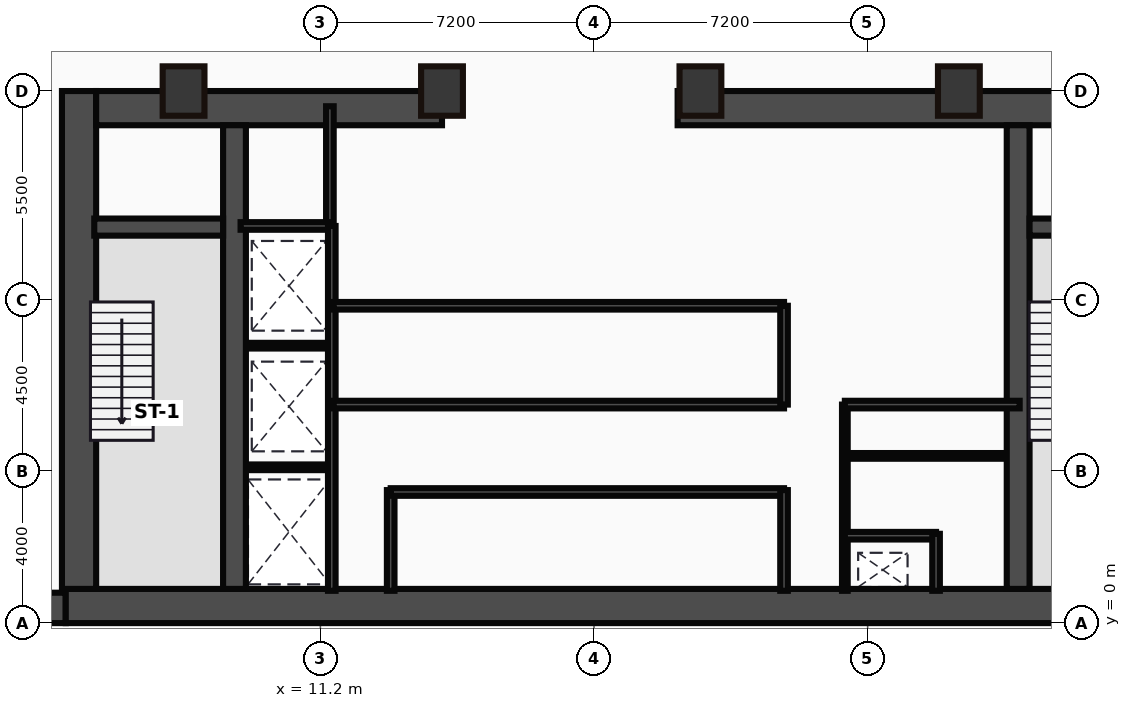
"""IFC4 building model, lengths in metres.
Left out: names, types, materials, properties, quantities, classifications, styles, units other than length and angle.
Written with IfcOpenShell. Run it as: python <this file> out.ifc"""

import sys

from ifc_helpers import new_model, si_unit, direction, frame, frame_2d, origin, origin_2d, place, context, subcontext, project, spatial, rectangle, hollow_rectangle, extrude, source, transform, mapped, element, fill, save


model = new_model("IFC4")
c1 = context("Model", 3, precision=1e-05, world=origin(), true_north=direction((0.0, 1.0)))
c2 = subcontext(c1, "Body", "Model", "MODEL_VIEW")
j1 = project(units=[si_unit("LENGTHUNIT", "METRE"), si_unit("PLANEANGLEUNIT", "RADIAN")], contexts=[c1])
p1 = place(None, origin())
s1 = spatial("IfcSite", under=j1, at=p1, CompositionType="ELEMENT")
p2 = place(p1, origin())
s2 = spatial("IfcBuilding", under=s1, at=p2, CompositionType="ELEMENT")
p3 = place(p2, frame((0.0, 0.0, -5.0)))
s3 = spatial("IfcBuildingStorey", under=s2, at=p3, CompositionType="ELEMENT", Elevation=-5.0)
m1 = source(origin(), c2, "Body", "SweptSolid", [
    extrude(rectangle(XDim=4.5, YDim=0.8, at=frame_2d((2.25, 0.0))), origin(), (0.0, 0.0, 1.0), 5.0),
])
p4 = place(p3, frame((0.0, 0.4, 0.0), z_axis=(0.0, 0.0, 1.0), x_axis=(1.0, 0.0, 0.0)))
e1 = element("IfcWall", 1, at=p4, inside=s3, PredefinedType="USERDEFINED", context=c2, shape_type="MappedRepresentation", body=[
    mapped(m1, transform((0.0, 0.0, 0.0))),
])
m2 = source(origin(), c2, "Body", "SweptSolid", [
    extrude(rectangle(XDim=29.5, YDim=0.9, at=frame_2d((14.75, 0.0))), origin(), (0.0, 0.0, 1.0), 5.0),
])
p5 = place(p3, frame((4.5, 0.45, 0.0), z_axis=(0.0, 0.0, 1.0), x_axis=(1.0, 0.0, 0.0)))
e2 = element("IfcWall", 2, at=p5, inside=s3, PredefinedType="SHEAR", context=c2, shape_type="MappedRepresentation", body=[
    mapped(m2, transform((0.0, 0.0, 0.0))),
])
m3 = source(origin(), c2, "Body", "SweptSolid", [
    extrude(rectangle(XDim=13.1, YDim=0.9, at=frame_2d((6.55, 0.0))), origin(), (0.0, 0.0, 1.0), 5.0),
])
p6 = place(p3, frame((4.85, 0.9, 0.0), z_axis=(0.0, 0.0, 1.0), x_axis=(0.0, 1.0, 0.0)))
e3 = element("IfcWall", 3, at=p6, inside=s3, PredefinedType="SHEAR", context=c2, shape_type="MappedRepresentation", body=[
    mapped(m3, transform((0.0, 0.0, 0.0))),
])
m4 = source(origin(), c2, "Body", "SweptSolid", [
    extrude(rectangle(XDim=9.1, YDim=0.9, at=frame_2d((4.55, 0.0))), origin(), (0.0, 0.0, 1.0), 5.0),
])
p7 = place(p3, frame((5.3, 13.55, 0.0), z_axis=(0.0, 0.0, 1.0), x_axis=(1.0, 0.0, 0.0)))
e4 = element("IfcWall", 4, at=p7, inside=s3, PredefinedType="SHEAR", context=c2, shape_type="MappedRepresentation", body=[
    mapped(m4, transform((0.0, 0.0, 0.0))),
])
p8 = place(p7, frame((4.1, 0.0, 0.0)))
e5 = element("IfcOpeningElement", 5, at=p8, cuts=e4, PredefinedType="OPENING", context=c2, shape_type="SweptSolid", body=[
    extrude(rectangle(XDim=1.1, YDim=2.15, at=frame_2d((0.55, 1.075))), frame((0.0, 0.46, 0.0), z_axis=(0.0, -1.0, 0.0), x_axis=(1.0, 0.0, 0.0)), (0.0, 0.0, 1.0), 0.92),
])
m5 = source(origin(), c2, "Body", "SweptSolid", [
    extrude(rectangle(XDim=12.6, YDim=0.9, at=frame_2d((6.3, 0.0))), origin(), (0.0, 0.0, 1.0), 5.0),
])
p9 = place(p3, frame((20.6, 13.55, 0.0), z_axis=(0.0, 0.0, 1.0), x_axis=(1.0, 0.0, 0.0)))
e6 = element("IfcWall", 6, at=p9, inside=s3, PredefinedType="SHEAR", context=c2, shape_type="MappedRepresentation", body=[
    mapped(m5, transform((0.0, 0.0, 0.0))),
])
p10 = place(p9, frame((9.25, 0.0, 0.0)))
e7 = element("IfcOpeningElement", 7, at=p10, cuts=e6, PredefinedType="OPENING", context=c2, shape_type="SweptSolid", body=[
    extrude(rectangle(XDim=1.1, YDim=2.15, at=frame_2d((0.55, 1.075))), frame((0.0, 0.46, 0.0), z_axis=(0.0, -1.0, 0.0), x_axis=(1.0, 0.0, 0.0)), (0.0, 0.0, 1.0), 0.92),
])
m6 = source(origin(), c2, "Body", "SweptSolid", [
    extrude(rectangle(XDim=12.2, YDim=0.6, at=frame_2d((6.1, 0.0))), origin(), (0.0, 0.0, 1.0), 5.0),
])
for number, where, z_axis, x_axis in (
    (8, (8.94, 0.9, 0.0), (0.0, 0.0, 1.0), (0.0, 1.0, 0.0)),
    (9, (29.56, 0.9, 0.0), (0.0, 0.0, 1.0), (0.0, 1.0, 0.0)),
):
    element("IfcWall", number, at=place(p3, frame(where, z_axis=z_axis, x_axis=x_axis)), inside=s3, PredefinedType="SHEAR", context=c2, shape_type="MappedRepresentation", body=[
        mapped(m6, transform((0.0, 0.0, 0.0))),
    ])
m7 = source(origin(), c2, "Body", "SweptSolid", [
    extrude(rectangle(XDim=3.39, YDim=0.45, at=frame_2d((1.695, 0.0))), origin(), (0.0, 0.0, 1.0), 5.0),
])
p11 = place(p3, frame((5.25, 10.42, 0.0), z_axis=(0.0, 0.0, 1.0), x_axis=(1.0, 0.0, 0.0)))
e10 = element("IfcWall", 10, at=p11, inside=s3, PredefinedType="SHEAR", context=c2, shape_type="MappedRepresentation", body=[
    mapped(m7, transform((0.0, 0.0, 0.0))),
])
p12 = place(p11, frame((1.05, 0.0, 0.0)))
e11 = element("IfcOpeningElement", 11, at=p12, cuts=e10, PredefinedType="OPENING", context=c2, shape_type="SweptSolid", body=[
    extrude(rectangle(XDim=1.1, YDim=2.15, at=frame_2d((0.55, 1.075))), frame((0.0, 0.235, 0.0), z_axis=(0.0, -1.0, 0.0), x_axis=(1.0, 0.0, 0.0)), (0.0, 0.0, 1.0), 0.47),
])
p13 = place(p3, frame((29.86, 10.42, 0.0), z_axis=(0.0, 0.0, 1.0), x_axis=(1.0, 0.0, 0.0)))
e12 = element("IfcWall", 12, at=p13, inside=s3, PredefinedType="SHEAR", context=c2, shape_type="MappedRepresentation", body=[
    mapped(m7, transform((0.0, 0.0, 0.0))),
])
p14 = place(p13, frame((1.1, 0.0, 0.0)))
e13 = element("IfcOpeningElement", 13, at=p14, cuts=e12, PredefinedType="OPENING", context=c2, shape_type="SweptSolid", body=[
    extrude(rectangle(XDim=1.1, YDim=2.15, at=frame_2d((0.55, 1.075))), frame((0.0, 0.235, 0.0), z_axis=(0.0, -1.0, 0.0), x_axis=(1.0, 0.0, 0.0)), (0.0, 0.0, 1.0), 0.47),
])
m8 = source(origin(), c2, "Body", "SweptSolid", [
    extrude(hollow_rectangle(XDim=1.1, YDim=1.3, WallThickness=0.055, at=origin_2d()), origin(), (0.0, 0.0, 1.0), 5.0),
])
for number, where, z_axis, x_axis in (
    (14, (7.6, 14.0, 0.0), (0.0, 0.0, 1.0), (1.0, 0.0, 0.0)),
    (15, (14.4, 14.0, 0.0), (0.0, 0.0, 1.0), (1.0, 0.0, 0.0)),
    (16, (21.2, 14.0, 0.0), (0.0, 0.0, 1.0), (1.0, 0.0, 0.0)),
    (17, (28.0, 14.0, 0.0), (0.0, 0.0, 1.0), (1.0, 0.0, 0.0)),
):
    element("IfcColumn", number, at=place(p3, frame(where, z_axis=z_axis, x_axis=x_axis)), inside=s3, PredefinedType="PILASTER", context=c2, shape_type="MappedRepresentation", body=[
        mapped(m8, transform((0.0, 0.0, 0.0))),
    ])
m9 = source(origin(), c2, "Body", "SweptSolid", [
    extrude(rectangle(XDim=3.18, YDim=0.2, at=frame_2d((1.59, 0.0))), origin(), (0.0, 0.0, 1.0), 4.7),
])
p15 = place(p3, frame((11.45, 10.42, 0.0), z_axis=(0.0, 0.0, 1.0), x_axis=(0.0, 1.0, 0.0)))
e18 = element("IfcWall", 18, at=p15, inside=s3, PredefinedType="PARTITIONING", context=c2, shape_type="MappedRepresentation", body=[
    mapped(m9, transform((0.0, 0.0, 0.0))),
])
m10 = source(origin(), c2, "Body", "SweptSolid", [
    extrude(rectangle(XDim=2.35, YDim=0.2, at=frame_2d((1.175, 0.0))), origin(), (0.0, 0.0, 1.0), 4.7),
])
p16 = place(p3, frame((9.1, 10.45, 0.0), z_axis=(0.0, 0.0, 1.0), x_axis=(1.0, 0.0, 0.0)))
e19 = element("IfcWall", 19, at=p16, inside=s3, PredefinedType="PARTITIONING", context=c2, shape_type="MappedRepresentation", body=[
    mapped(m10, transform((0.0, 0.0, 0.0))),
])
p17 = place(p16, frame((0.55, 0.0, 0.0)))
e20 = element("IfcOpeningElement", 20, at=p17, cuts=e19, PredefinedType="OPENING", context=c2, shape_type="SweptSolid", body=[
    extrude(rectangle(XDim=1.1, YDim=2.15, at=frame_2d((0.55, 1.075))), frame((0.0, 0.11, 0.0), z_axis=(0.0, -1.0, 0.0), x_axis=(1.0, 0.0, 0.0)), (0.0, 0.0, 1.0), 0.22),
])
m11 = source(origin(), c2, "Body", "SweptSolid", [
    extrude(rectangle(XDim=9.6, YDim=0.2, at=frame_2d((4.8, 0.0))), origin(), (0.0, 0.0, 1.0), 4.7),
])
p18 = place(p3, frame((11.5, 0.85, 0.0), z_axis=(0.0, 0.0, 1.0), x_axis=(0.0, 1.0, 0.0)))
e21 = element("IfcWall", 21, at=p18, inside=s3, PredefinedType="PARTITIONING", context=c2, shape_type="MappedRepresentation", body=[
    mapped(m11, transform((0.0, 0.0, 0.0))),
])
p19 = place(p18, frame((4.2, 0.0, 0.0)))
e22 = element("IfcOpeningElement", 22, at=p19, cuts=e21, PredefinedType="OPENING", context=c2, shape_type="SweptSolid", body=[
    extrude(rectangle(XDim=1.1, YDim=2.15, at=frame_2d((0.55, 1.075))), frame((0.0, 0.11, 0.0), z_axis=(0.0, -1.0, 0.0), x_axis=(1.0, 0.0, 0.0)), (0.0, 0.0, 1.0), 0.22),
])
p20 = place(p18, frame((0.9, 0.0, 0.0)))
e23 = element("IfcOpeningElement", 23, at=p20, cuts=e21, PredefinedType="OPENING", context=c2, shape_type="SweptSolid", body=[
    extrude(rectangle(XDim=1.2, YDim=2.15, at=frame_2d((0.6, 1.075))), frame((0.0, 0.11, 0.0), z_axis=(0.0, -1.0, 0.0), x_axis=(1.0, 0.0, 0.0)), (0.0, 0.0, 1.0), 0.22),
])
m12 = source(origin(), c2, "Body", "SweptSolid", [
    extrude(rectangle(XDim=2.4, YDim=0.15, at=frame_2d((1.2, 0.0))), origin(), (0.0, 0.0, 1.0), 4.7),
])
for number, where, z_axis, x_axis in (
    (24, (9.1, 4.1, 0.0), (0.0, 0.0, 1.0), (1.0, 0.0, 0.0)),
    (25, (9.1, 7.3, 0.0), (0.0, 0.0, 1.0), (1.0, 0.0, 0.0)),
):
    element("IfcWall", number, at=place(p3, frame(where, z_axis=z_axis, x_axis=x_axis)), inside=s3, PredefinedType="PARTITIONING", context=c2, shape_type="MappedRepresentation", body=[
        mapped(m12, transform((0.0, 0.0, 0.0))),
    ])
m13 = source(origin(), c2, "Body", "SweptSolid", [
    extrude(rectangle(XDim=2.65, YDim=0.2, at=frame_2d((1.325, 0.0))), origin(), (0.0, 0.0, 1.0), 4.7),
])
p21 = place(p3, frame((13.05, 0.85, 0.0), z_axis=(0.0, 0.0, 1.0), x_axis=(0.0, 1.0, 0.0)))
e26 = element("IfcWall", 26, at=p21, inside=s3, PredefinedType="PARTITIONING", context=c2, shape_type="MappedRepresentation", body=[
    mapped(m13, transform((0.0, 0.0, 0.0))),
])
m14 = source(origin(), c2, "Body", "SweptSolid", [
    extrude(rectangle(XDim=10.35, YDim=0.2, at=frame_2d((5.175, 0.0))), origin(), (0.0, 0.0, 1.0), 4.7),
])
p22 = place(p3, frame((13.05, 3.45, 0.0), z_axis=(0.0, 0.0, 1.0), x_axis=(1.0, 0.0, 0.0)))
e27 = element("IfcWall", 27, at=p22, inside=s3, PredefinedType="PARTITIONING", context=c2, shape_type="MappedRepresentation", body=[
    mapped(m14, transform((0.0, 0.0, 0.0))),
])
p23 = place(p22, frame((5.2, 0.0, 0.0)))
e28 = element("IfcOpeningElement", 28, at=p23, cuts=e27, PredefinedType="OPENING", context=c2, shape_type="SweptSolid", body=[
    extrude(rectangle(XDim=1.1, YDim=2.15, at=frame_2d((0.55, 1.075))), frame((0.0, 0.11, 0.0), z_axis=(0.0, -1.0, 0.0), x_axis=(1.0, 0.0, 0.0)), (0.0, 0.0, 1.0), 0.22),
])
p24 = place(p3, frame((23.4, 0.85, 0.0), z_axis=(0.0, 0.0, 1.0), x_axis=(0.0, 1.0, 0.0)))
e29 = element("IfcWall", 29, at=p24, inside=s3, PredefinedType="PARTITIONING", context=c2, shape_type="MappedRepresentation", body=[
    mapped(m13, transform((0.0, 0.0, 0.0))),
])
m15 = source(origin(), c2, "Body", "SweptSolid", [
    extrude(rectangle(XDim=11.85, YDim=0.2, at=frame_2d((5.925, 0.0))), origin(), (0.0, 0.0, 1.0), 4.7),
])
p25 = place(p3, frame((11.55, 5.75, 0.0), z_axis=(0.0, 0.0, 1.0), x_axis=(1.0, 0.0, 0.0)))
e30 = element("IfcWall", 30, at=p25, inside=s3, PredefinedType="PARTITIONING", context=c2, shape_type="MappedRepresentation", body=[
    mapped(m15, transform((0.0, 0.0, 0.0))),
])
p26 = place(p25, frame((5.2, 0.0, 0.0)))
e31 = element("IfcOpeningElement", 31, at=p26, cuts=e30, PredefinedType="OPENING", context=c2, shape_type="SweptSolid", body=[
    extrude(rectangle(XDim=1.1, YDim=2.15, at=frame_2d((0.55, 1.075))), frame((0.0, 0.11, 0.0), z_axis=(0.0, -1.0, 0.0), x_axis=(1.0, 0.0, 0.0)), (0.0, 0.0, 1.0), 0.22),
])
p27 = place(p3, frame((11.55, 8.35, 0.0), z_axis=(0.0, 0.0, 1.0), x_axis=(1.0, 0.0, 0.0)))
e32 = element("IfcWall", 32, at=p27, inside=s3, PredefinedType="PARTITIONING", context=c2, shape_type="MappedRepresentation", body=[
    mapped(m15, transform((0.0, 0.0, 0.0))),
])
m16 = source(origin(), c2, "Body", "SweptSolid", [
    extrude(rectangle(XDim=2.6, YDim=0.2, at=frame_2d((1.3, 0.0))), origin(), (0.0, 0.0, 1.0), 4.7),
])
p28 = place(p3, frame((23.4, 5.75, 0.0), z_axis=(0.0, 0.0, 1.0), x_axis=(0.0, 1.0, 0.0)))
e33 = element("IfcWall", 33, at=p28, inside=s3, PredefinedType="PARTITIONING", context=c2, shape_type="MappedRepresentation", body=[
    mapped(m16, transform((0.0, 0.0, 0.0))),
])
m17 = source(origin(), c2, "Body", "SweptSolid", [
    extrude(rectangle(XDim=4.9, YDim=0.15, at=frame_2d((2.45, 0.0))), origin(), (0.0, 0.0, 1.0), 4.7),
])
p29 = place(p3, frame((25.0, 0.85, 0.0), z_axis=(0.0, 0.0, 1.0), x_axis=(0.0, 1.0, 0.0)))
e34 = element("IfcWall", 34, at=p29, inside=s3, PredefinedType="PARTITIONING", context=c2, shape_type="MappedRepresentation", body=[
    mapped(m17, transform((0.0, 0.0, 0.0))),
])
p30 = place(p29, frame((2.0, 0.0, 0.0)))
e35 = element("IfcOpeningElement", 35, at=p30, cuts=e34, PredefinedType="OPENING", context=c2, shape_type="SweptSolid", body=[
    extrude(rectangle(XDim=0.95, YDim=2.15, at=frame_2d((0.475, 1.075))), frame((0.0, 0.085, 0.0), z_axis=(0.0, -1.0, 0.0), x_axis=(1.0, 0.0, 0.0)), (0.0, 0.0, 1.0), 0.17),
])
p31 = place(p29, frame((3.75, 0.0, 0.0)))
e36 = element("IfcOpeningElement", 36, at=p31, cuts=e34, PredefinedType="OPENING", context=c2, shape_type="SweptSolid", body=[
    extrude(rectangle(XDim=0.85, YDim=2.15, at=frame_2d((0.425, 1.075))), frame((0.0, 0.085, 0.0), z_axis=(0.0, -1.0, 0.0), x_axis=(1.0, 0.0, 0.0)), (0.0, 0.0, 1.0), 0.17),
])
m18 = source(origin(), c2, "Body", "SweptSolid", [
    extrude(rectangle(XDim=4.6, YDim=0.2, at=frame_2d((2.3, 0.0))), origin(), (0.0, 0.0, 1.0), 4.7),
])
p32 = place(p3, frame((25.0, 5.75, 0.0), z_axis=(0.0, 0.0, 1.0), x_axis=(1.0, 0.0, 0.0)))
e37 = element("IfcWall", 37, at=p32, inside=s3, PredefinedType="PARTITIONING", context=c2, shape_type="MappedRepresentation", body=[
    mapped(m18, transform((0.0, 0.0, 0.0))),
])
m19 = source(origin(), c2, "Body", "SweptSolid", [
    extrude(rectangle(XDim=2.4, YDim=0.2, at=frame_2d((1.2, 0.0))), origin(), (0.0, 0.0, 1.0), 4.7),
])
p33 = place(p3, frame((25.0, 2.3, 0.0), z_axis=(0.0, 0.0, 1.0), x_axis=(1.0, 0.0, 0.0)))
e38 = element("IfcWall", 38, at=p33, inside=s3, PredefinedType="PARTITIONING", context=c2, shape_type="MappedRepresentation", body=[
    mapped(m19, transform((0.0, 0.0, 0.0))),
])
m20 = source(origin(), c2, "Body", "SweptSolid", [
    extrude(rectangle(XDim=1.5, YDim=0.2, at=frame_2d((0.75, 0.0))), origin(), (0.0, 0.0, 1.0), 4.7),
])
p34 = place(p3, frame((27.4, 0.85, 0.0), z_axis=(0.0, 0.0, 1.0), x_axis=(0.0, 1.0, 0.0)))
e39 = element("IfcWall", 39, at=p34, inside=s3, PredefinedType="PARTITIONING", context=c2, shape_type="MappedRepresentation", body=[
    mapped(m20, transform((0.0, 0.0, 0.0))),
])
m21 = source(origin(), c2, "Body", "SweptSolid", [
    extrude(rectangle(XDim=4.55, YDim=0.15, at=frame_2d((2.275, 0.0))), origin(), (0.0, 0.0, 1.0), 4.7),
])
p35 = place(p3, frame((25.0, 4.4, 0.0), z_axis=(0.0, 0.0, 1.0), x_axis=(1.0, 0.0, 0.0)))
e40 = element("IfcWall", 40, at=p35, inside=s3, PredefinedType="PARTITIONING", context=c2, shape_type="MappedRepresentation", body=[
    mapped(m21, transform((0.0, 0.0, 0.0))),
])
m22 = source(origin(), c2, "Body", "SweptSolid", [
    extrude(rectangle(XDim=1.1, YDim=2.15, at=frame_2d((0.55, 1.075))), frame((0.0, 0.025, 0.0), z_axis=(0.0, -1.0, 0.0), x_axis=(1.0, 0.0, 0.0)), (0.0, 0.0, 1.0), 0.05),
])
p36 = place(p12, frame((1.1, 0.0, 0.0), z_axis=(0.0, 0.0, 1.0), x_axis=(-1.0, 0.0, 0.0)))
e41 = element("IfcDoor", 41, at=p36, inside=s3, OperationType="SINGLE_SWING_LEFT", PredefinedType="DOOR", context=c2, shape_type="MappedRepresentation", body=[
    mapped(m22, transform((0.0, 0.0, 0.0))),
])
fill(e11, e41)
p37 = place(p8, origin())
e42 = element("IfcDoor", 42, at=p37, inside=s3, OperationType="SINGLE_SWING_RIGHT", PredefinedType="DOOR", context=c2, shape_type="MappedRepresentation", body=[
    mapped(m22, transform((0.0, 0.0, 0.0))),
])
fill(e5, e42)
p38 = place(p10, origin())
e43 = element("IfcDoor", 43, at=p38, inside=s3, OperationType="SINGLE_SWING_LEFT", PredefinedType="DOOR", context=c2, shape_type="MappedRepresentation", body=[
    mapped(m22, transform((0.0, 0.0, 0.0))),
])
fill(e7, e43)
p39 = place(p17, origin())
e44 = element("IfcDoor", 44, at=p39, inside=s3, OperationType="SLIDING_TO_LEFT", PredefinedType="DOOR", context=c2, shape_type="MappedRepresentation", body=[
    mapped(m22, transform((0.0, 0.0, 0.0))),
])
fill(e20, e44)
p40 = place(p19, frame((1.1, 0.0, 0.0), z_axis=(0.0, 0.0, 1.0), x_axis=(-1.0, 0.0, 0.0)))
e45 = element("IfcDoor", 45, at=p40, inside=s3, OperationType="SLIDING_TO_LEFT", PredefinedType="DOOR", context=c2, shape_type="MappedRepresentation", body=[
    mapped(m22, transform((0.0, 0.0, 0.0))),
])
fill(e22, e45)
m23 = source(origin(), c2, "Body", "SweptSolid", [
    extrude(rectangle(XDim=1.2, YDim=2.15, at=frame_2d((0.6, 1.075))), frame((0.0, 0.025, 0.0), z_axis=(0.0, -1.0, 0.0), x_axis=(1.0, 0.0, 0.0)), (0.0, 0.0, 1.0), 0.05),
])
p41 = place(p20, frame((1.2, 0.0, 0.0), z_axis=(0.0, 0.0, 1.0), x_axis=(-1.0, 0.0, 0.0)))
e46 = element("IfcDoor", 46, at=p41, inside=s3, OperationType="SLIDING_TO_LEFT", PredefinedType="DOOR", context=c2, shape_type="MappedRepresentation", body=[
    mapped(m23, transform((0.0, 0.0, 0.0))),
])
fill(e23, e46)
p42 = place(p23, origin())
e47 = element("IfcDoor", 47, at=p42, inside=s3, OperationType="SINGLE_SWING_LEFT", PredefinedType="DOOR", context=c2, shape_type="MappedRepresentation", body=[
    mapped(m22, transform((0.0, 0.0, 0.0))),
])
fill(e28, e47)
p43 = place(p26, frame((1.1, 0.0, 0.0), z_axis=(0.0, 0.0, 1.0), x_axis=(-1.0, 0.0, 0.0)))
e48 = element("IfcDoor", 48, at=p43, inside=s3, OperationType="SINGLE_SWING_RIGHT", PredefinedType="DOOR", context=c2, shape_type="MappedRepresentation", body=[
    mapped(m22, transform((0.0, 0.0, 0.0))),
])
fill(e31, e48)
m24 = source(origin(), c2, "Body", "SweptSolid", [
    extrude(rectangle(XDim=0.95, YDim=2.15, at=frame_2d((0.475, 1.075))), frame((0.0, 0.025, 0.0), z_axis=(0.0, -1.0, 0.0), x_axis=(1.0, 0.0, 0.0)), (0.0, 0.0, 1.0), 0.05),
])
p44 = place(p30, origin())
e49 = element("IfcDoor", 49, at=p44, inside=s3, OperationType="SINGLE_SWING_LEFT", PredefinedType="DOOR", context=c2, shape_type="MappedRepresentation", body=[
    mapped(m24, transform((0.0, 0.0, 0.0))),
])
fill(e35, e49)
m25 = source(origin(), c2, "Body", "SweptSolid", [
    extrude(rectangle(XDim=0.85, YDim=2.15, at=frame_2d((0.425, 1.075))), frame((0.0, 0.025, 0.0), z_axis=(0.0, -1.0, 0.0), x_axis=(1.0, 0.0, 0.0)), (0.0, 0.0, 1.0), 0.05),
])
p45 = place(p31, origin())
e50 = element("IfcDoor", 50, at=p45, inside=s3, OperationType="SINGLE_SWING_RIGHT", PredefinedType="DOOR", context=c2, shape_type="MappedRepresentation", body=[
    mapped(m25, transform((0.0, 0.0, 0.0))),
])
fill(e36, e50)
save(model, sys.argv[1])
